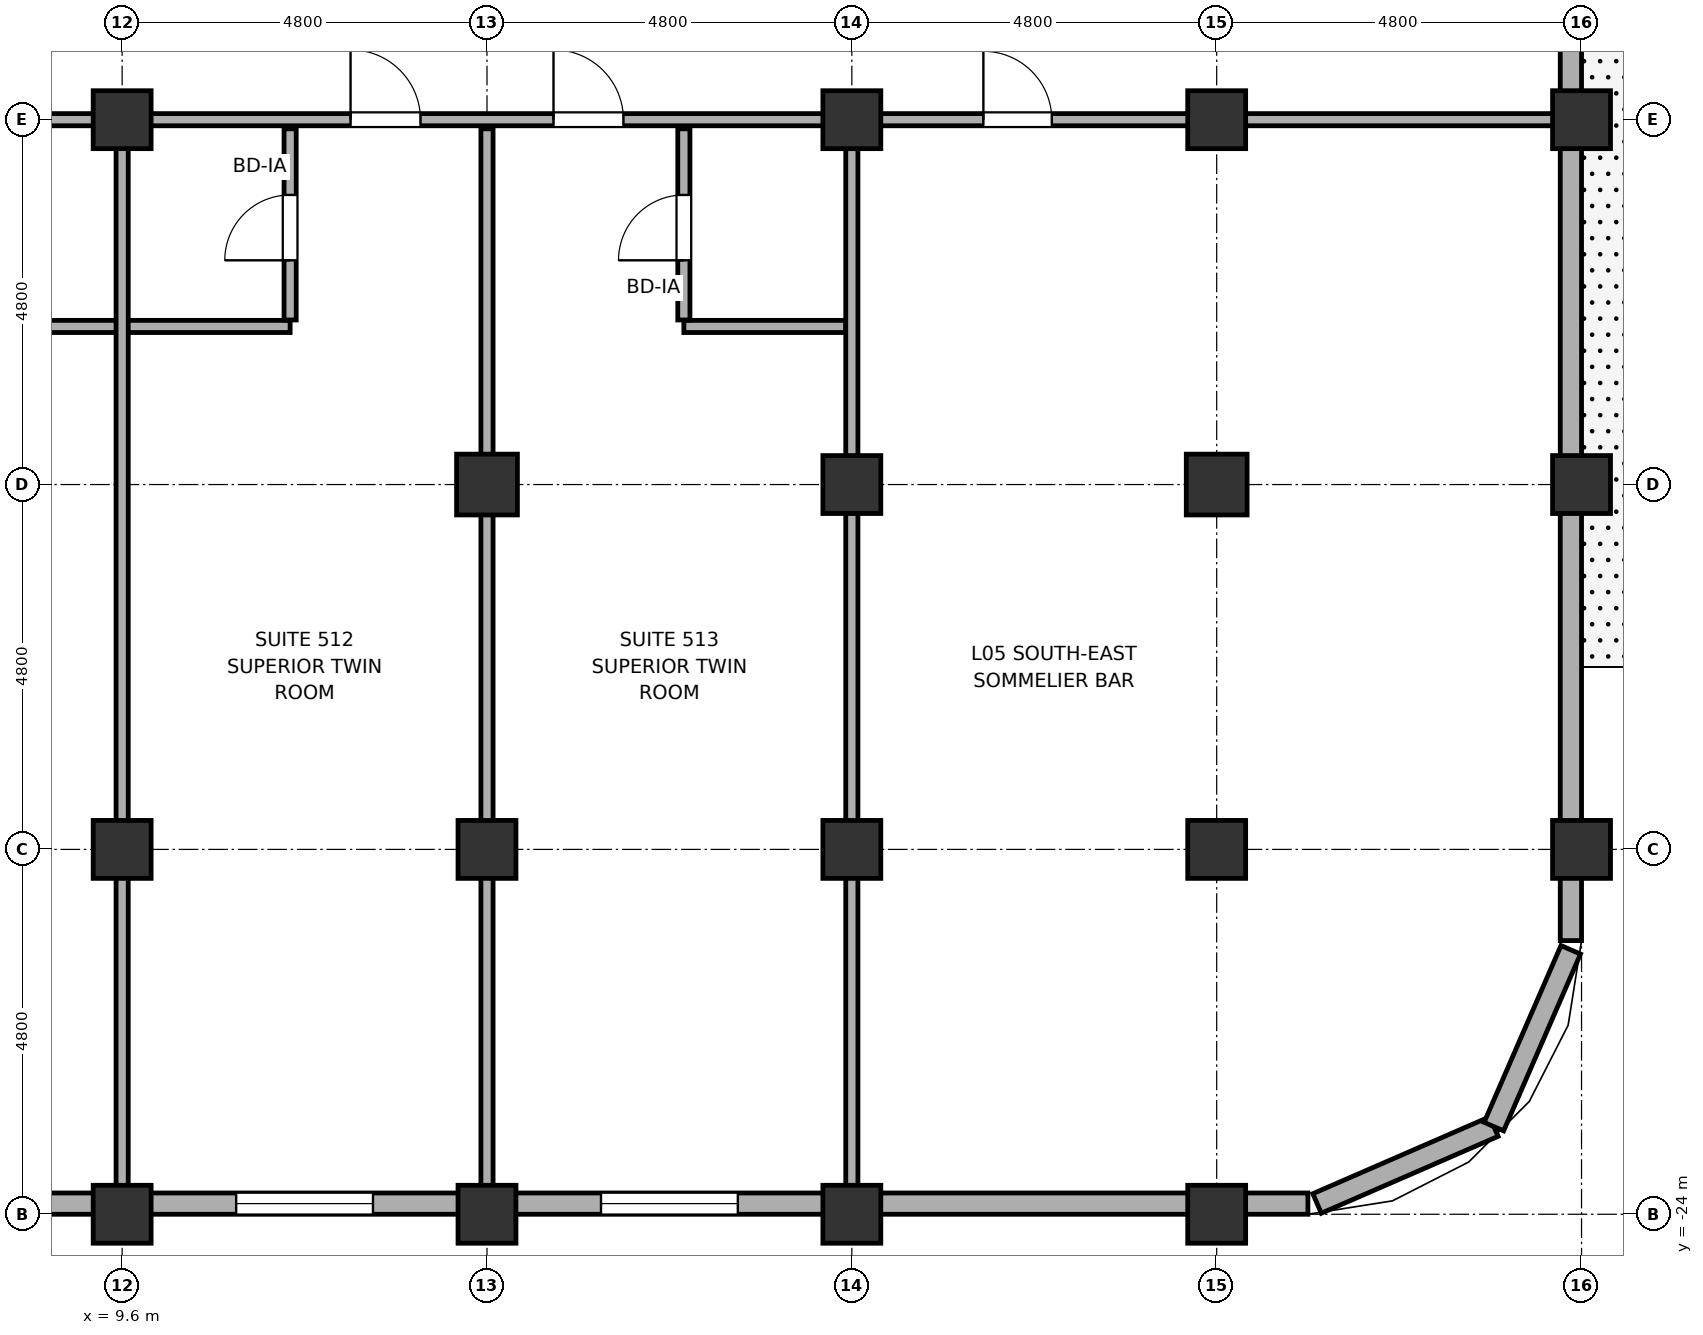
"""IFC4 building model, lengths in metres.
Left out: names, types, materials, properties, quantities, classifications, styles, units other than length and angle.
Written with IfcOpenShell. Run it as: python <this file> out.ifc"""

import sys

from ifc_helpers import new_model, si_unit, direction, frame, frame_2d, origin, origin_2d, place, context, subcontext, project, spatial, rectangle, hollow_rectangle, hollow_circle, extrude, element, fill, save


model = new_model("IFC4")
c1 = context("Model", 3, precision=1e-05, world=origin(), true_north=direction((0.0, 1.0)))
c2 = subcontext(c1, "Body", "Model", "MODEL_VIEW")
j1 = project(units=[si_unit("LENGTHUNIT", "METRE"), si_unit("PLANEANGLEUNIT", "RADIAN")], contexts=[c1])
p1 = place(None, origin())
s1 = spatial("IfcSite", under=j1, at=p1, CompositionType="ELEMENT")
p2 = place(p1, origin())
s2 = spatial("IfcBuilding", under=s1, at=p2, CompositionType="ELEMENT")
p3 = place(p2, frame((0.0, 0.0, 30.0)))
s3 = spatial("IfcBuildingStorey", under=s2, at=p3, CompositionType="ELEMENT", Elevation=30.0)
for number, where, z_axis, x_axis in (
    (1, (9.6, -24.0, 0.0), (0.0, 0.0, 1.0), (1.0, 0.0, 0.0)),
    (2, (9.6, -19.2, 0.0), (0.0, 0.0, 1.0), (1.0, 0.0, 0.0)),
    (3, (9.6, -9.6, 0.0), (0.0, 0.0, 1.0), (1.0, 0.0, 0.0)),
    (4, (14.4, -24.0, 0.0), (0.0, 0.0, 1.0), (1.0, 0.0, 0.0)),
    (5, (14.4, -19.2, 0.0), (0.0, 0.0, 1.0), (1.0, 0.0, 0.0)),
):
    element("IfcColumn", number, at=place(p3, frame(where, z_axis=z_axis, x_axis=x_axis)), inside=s3, PredefinedType="COLUMN", context=c2, shape_type="SweptSolid", body=[
        extrude(hollow_circle(Radius=0.381, WallThickness=0.032, at=origin_2d()), origin(), (0.0, 0.0, 1.0), 3.7),
    ])
p4 = place(p3, frame((14.4, -14.4, 0.0), z_axis=(0.0, 0.0, 1.0), x_axis=(1.0, 0.0, 0.0)))
e6 = element("IfcColumn", 6, at=p4, inside=s3, PredefinedType="COLUMN", context=c2, shape_type="SweptSolid", body=[
    extrude(hollow_rectangle(XDim=0.8, YDim=0.8, WallThickness=0.036, at=origin_2d()), origin(), (0.0, 0.0, 1.0), 3.7),
])
for number, where, z_axis, x_axis in (
    (7, (19.2, -24.0, 0.0), (0.0, 0.0, 1.0), (1.0, 0.0, 0.0)),
    (8, (19.2, -19.2, 0.0), (0.0, 0.0, 1.0), (1.0, 0.0, 0.0)),
    (9, (19.2, -14.4, 0.0), (0.0, 0.0, 1.0), (1.0, 0.0, 0.0)),
    (10, (19.2, -9.6, 0.0), (0.0, 0.0, 1.0), (1.0, 0.0, 0.0)),
    (11, (24.0, -24.0, 0.0), (0.0, 0.0, 1.0), (1.0, 0.0, 0.0)),
    (12, (24.0, -19.2, 0.0), (0.0, 0.0, 1.0), (1.0, 0.0, 0.0)),
):
    element("IfcColumn", number, at=place(p3, frame(where, z_axis=z_axis, x_axis=x_axis)), inside=s3, PredefinedType="COLUMN", context=c2, shape_type="SweptSolid", body=[
        extrude(hollow_circle(Radius=0.381, WallThickness=0.032, at=origin_2d()), origin(), (0.0, 0.0, 1.0), 3.7),
    ])
p5 = place(p3, frame((24.0, -14.4, 0.0), z_axis=(0.0, 0.0, 1.0), x_axis=(1.0, 0.0, 0.0)))
e13 = element("IfcColumn", 13, at=p5, inside=s3, PredefinedType="COLUMN", context=c2, shape_type="SweptSolid", body=[
    extrude(hollow_rectangle(XDim=0.8, YDim=0.8, WallThickness=0.036, at=origin_2d()), origin(), (0.0, 0.0, 1.0), 3.7),
])
for number, where, z_axis, x_axis in (
    (14, (24.0, -9.6, 0.0), (0.0, 0.0, 1.0), (1.0, 0.0, 0.0)),
    (15, (28.8, -19.2, 0.0), (0.0, 0.0, 1.0), (1.0, 0.0, 0.0)),
    (16, (28.8, -14.4, 0.0), (0.0, 0.0, 1.0), (1.0, 0.0, 0.0)),
    (17, (28.8, -9.6, 0.0), (0.0, 0.0, 1.0), (1.0, 0.0, 0.0)),
):
    element("IfcColumn", number, at=place(p3, frame(where, z_axis=z_axis, x_axis=x_axis)), inside=s3, PredefinedType="COLUMN", context=c2, shape_type="SweptSolid", body=[
        extrude(hollow_circle(Radius=0.381, WallThickness=0.032, at=origin_2d()), origin(), (0.0, 0.0, 1.0), 3.7),
    ])
p6 = place(p3, frame((25.321, -23.858, 0.0), z_axis=(0.0, 0.0, 1.0), x_axis=(0.917060872934, 0.398747232384, 0.0)))
e18 = element("IfcWall", 18, at=p6, inside=s3, PredefinedType="SOLIDWALL", context=c2, shape_type="SweptSolid", body=[
    extrude(rectangle(XDim=2.536, YDim=0.28, at=frame_2d((1.268, 0.0))), origin(), (0.0, 0.0, 1.0), 2.12),
])
p7 = place(p3, frame((27.646, -22.847, 0.0), z_axis=(0.0, 0.0, 1.0), x_axis=(0.398792985289, 0.917040977756, 0.0)))
e19 = element("IfcWall", 19, at=p7, inside=s3, PredefinedType="SOLIDWALL", context=c2, shape_type="SweptSolid", body=[
    extrude(rectangle(XDim=2.536, YDim=0.28, at=frame_2d((1.268, 0.0))), origin(), (0.0, 0.0, 1.0), 2.12),
])
p8 = place(p3, frame((4.75, -23.86, 0.0), z_axis=(0.0, 0.0, 1.0), x_axis=(1.0, 0.0, 0.0)))
e20 = element("IfcWall", 20, at=p8, inside=s3, PredefinedType="SOLIDWALL", context=c2, shape_type="SweptSolid", body=[
    extrude(rectangle(XDim=20.45, YDim=0.28, at=frame_2d((10.225, 0.0))), origin(), (0.0, 0.0, 1.0), 2.12),
])
p9 = place(p8, frame((1.55, 0.0, 0.75)))
e21 = element("IfcOpeningElement", 21, at=p9, cuts=e20, PredefinedType="OPENING", context=c2, shape_type="SweptSolid", body=[
    extrude(rectangle(XDim=1.8, YDim=1.15, at=frame_2d((0.9, 0.575))), frame((0.0, 0.155, 0.0), z_axis=(0.0, -1.0, 0.0), x_axis=(1.0, 0.0, 0.0)), (0.0, 0.0, 1.0), 0.31),
])
p10 = place(p8, frame((6.35, 0.0, 0.75)))
e22 = element("IfcOpeningElement", 22, at=p10, cuts=e20, PredefinedType="OPENING", context=c2, shape_type="SweptSolid", body=[
    extrude(rectangle(XDim=1.8, YDim=1.15, at=frame_2d((0.9, 0.575))), frame((0.0, 0.155, 0.0), z_axis=(0.0, -1.0, 0.0), x_axis=(1.0, 0.0, 0.0)), (0.0, 0.0, 1.0), 0.31),
])
p11 = place(p8, frame((11.15, 0.0, 0.75)))
e23 = element("IfcOpeningElement", 23, at=p11, cuts=e20, PredefinedType="OPENING", context=c2, shape_type="SweptSolid", body=[
    extrude(rectangle(XDim=1.8, YDim=1.15, at=frame_2d((0.9, 0.575))), frame((0.0, 0.155, 0.0), z_axis=(0.0, -1.0, 0.0), x_axis=(1.0, 0.0, 0.0)), (0.0, 0.0, 1.0), 0.31),
])
p12 = place(p3, frame((28.66, -20.4, 0.0), z_axis=(0.0, 0.0, 1.0), x_axis=(0.0, 1.0, 0.0)))
e24 = element("IfcWall", 24, at=p12, inside=s3, PredefinedType="SOLIDWALL", context=c2, shape_type="SweptSolid", body=[
    extrude(rectangle(XDim=20.38, YDim=0.28, at=frame_2d((10.19, 0.0))), origin(), (0.0, 0.0, 1.0), 2.12),
])
p13 = place(p12, frame((12.3, 0.0, 0.0)))
e25 = element("IfcOpeningElement", 25, at=p13, cuts=e24, PredefinedType="OPENING", context=c2, shape_type="SweptSolid", body=[
    extrude(rectangle(XDim=1.8, YDim=2.02, at=frame_2d((0.9, 1.01))), frame((0.0, 0.155, 0.0), z_axis=(0.0, -1.0, 0.0), x_axis=(1.0, 0.0, 0.0)), (0.0, 0.0, 1.0), 0.31),
])
p14 = place(p12, frame((17.25, 0.0, 0.75)))
e26 = element("IfcOpeningElement", 26, at=p14, cuts=e24, PredefinedType="OPENING", context=c2, shape_type="SweptSolid", body=[
    extrude(rectangle(XDim=1.5, YDim=1.15, at=frame_2d((0.75, 0.575))), frame((0.0, 0.155, 0.0), z_axis=(0.0, -1.0, 0.0), x_axis=(1.0, 0.0, 0.0)), (0.0, 0.0, 1.0), 0.31),
])
p15 = place(p3, frame((7.39, -12.32, 0.0), z_axis=(0.0, 0.0, 1.0), x_axis=(1.0, 0.0, 0.0)))
e27 = element("IfcWall", 27, at=p15, inside=s3, PredefinedType="PARTITIONING", context=c2, shape_type="SweptSolid", body=[
    extrude(rectangle(XDim=4.42, YDim=0.16, at=frame_2d((2.21, 0.0))), origin(), (0.0, 0.0, 1.0), 3.02),
])
p16 = place(p3, frame((16.99, -12.32, 0.0), z_axis=(0.0, 0.0, 1.0), x_axis=(1.0, 0.0, 0.0)))
e28 = element("IfcWall", 28, at=p16, inside=s3, PredefinedType="PARTITIONING", context=c2, shape_type="SweptSolid", body=[
    extrude(rectangle(XDim=2.13, YDim=0.16, at=frame_2d((1.065, 0.0))), origin(), (0.0, 0.0, 1.0), 2.82),
])
p17 = place(p3, frame((-33.31, -9.6, 0.0), z_axis=(0.0, 0.0, 1.0), x_axis=(1.0, 0.0, 0.0)))
e29 = element("IfcWall", 29, at=p17, inside=s3, PredefinedType="PARTITIONING", context=c2, shape_type="SweptSolid", body=[
    extrude(rectangle(XDim=61.82, YDim=0.16, at=frame_2d((30.91, 0.0))), origin(), (0.0, 0.0, 1.0), 2.12),
])
p18 = place(p17, frame((6.679, 0.0, 0.0)))
e30 = element("IfcOpeningElement", 30, at=p18, cuts=e29, PredefinedType="OPENING", context=c2, shape_type="SweptSolid", body=[
    extrude(rectangle(XDim=0.9, YDim=2.02, at=frame_2d((0.45, 1.01))), frame((0.0, 0.095, 0.0), z_axis=(0.0, -1.0, 0.0), x_axis=(1.0, 0.0, 0.0)), (0.0, 0.0, 1.0), 0.19),
])
p19 = place(p17, frame((54.24, 0.0, 0.0)))
e31 = element("IfcOpeningElement", 31, at=p19, cuts=e29, PredefinedType="OPENING", context=c2, shape_type="SweptSolid", body=[
    extrude(rectangle(XDim=0.9, YDim=2.02, at=frame_2d((0.45, 1.01))), frame((0.0, 0.095, 0.0), z_axis=(0.0, -1.0, 0.0), x_axis=(1.0, 0.0, 0.0)), (0.0, 0.0, 1.0), 0.19),
])
p20 = place(p17, frame((10.68, 0.0, 0.0)))
e32 = element("IfcOpeningElement", 32, at=p20, cuts=e29, PredefinedType="OPENING", context=c2, shape_type="SweptSolid", body=[
    extrude(rectangle(XDim=0.92, YDim=2.02, at=frame_2d((0.46, 1.01))), frame((0.0, 0.095, 0.0), z_axis=(0.0, -1.0, 0.0), x_axis=(1.0, 0.0, 0.0)), (0.0, 0.0, 1.0), 0.19),
])
p21 = place(p17, frame((17.115, 0.0, 0.0)))
e33 = element("IfcOpeningElement", 33, at=p21, cuts=e29, PredefinedType="OPENING", context=c2, shape_type="SweptSolid", body=[
    extrude(rectangle(XDim=0.92, YDim=2.02, at=frame_2d((0.46, 1.01))), frame((0.0, 0.095, 0.0), z_axis=(0.0, -1.0, 0.0), x_axis=(1.0, 0.0, 0.0)), (0.0, 0.0, 1.0), 0.19),
])
p22 = place(p17, frame((19.785, 0.0, 0.0)))
e34 = element("IfcOpeningElement", 34, at=p22, cuts=e29, PredefinedType="OPENING", context=c2, shape_type="SweptSolid", body=[
    extrude(rectangle(XDim=0.92, YDim=2.02, at=frame_2d((0.46, 1.01))), frame((0.0, 0.095, 0.0), z_axis=(0.0, -1.0, 0.0), x_axis=(1.0, 0.0, 0.0)), (0.0, 0.0, 1.0), 0.19),
])
p23 = place(p17, frame((26.715, 0.0, 0.0)))
e35 = element("IfcOpeningElement", 35, at=p23, cuts=e29, PredefinedType="OPENING", context=c2, shape_type="SweptSolid", body=[
    extrude(rectangle(XDim=0.92, YDim=2.02, at=frame_2d((0.46, 1.01))), frame((0.0, 0.095, 0.0), z_axis=(0.0, -1.0, 0.0), x_axis=(1.0, 0.0, 0.0)), (0.0, 0.0, 1.0), 0.19),
])
p24 = place(p17, frame((29.385, 0.0, 0.0)))
e36 = element("IfcOpeningElement", 36, at=p24, cuts=e29, PredefinedType="OPENING", context=c2, shape_type="SweptSolid", body=[
    extrude(rectangle(XDim=0.92, YDim=2.02, at=frame_2d((0.46, 1.01))), frame((0.0, 0.095, 0.0), z_axis=(0.0, -1.0, 0.0), x_axis=(1.0, 0.0, 0.0)), (0.0, 0.0, 1.0), 0.19),
])
p25 = place(p17, frame((36.315, 0.0, 0.0)))
e37 = element("IfcOpeningElement", 37, at=p25, cuts=e29, PredefinedType="OPENING", context=c2, shape_type="SweptSolid", body=[
    extrude(rectangle(XDim=0.92, YDim=2.02, at=frame_2d((0.46, 1.01))), frame((0.0, 0.095, 0.0), z_axis=(0.0, -1.0, 0.0), x_axis=(1.0, 0.0, 0.0)), (0.0, 0.0, 1.0), 0.19),
])
p26 = place(p17, frame((38.985, 0.0, 0.0)))
e38 = element("IfcOpeningElement", 38, at=p26, cuts=e29, PredefinedType="OPENING", context=c2, shape_type="SweptSolid", body=[
    extrude(rectangle(XDim=0.92, YDim=2.02, at=frame_2d((0.46, 1.01))), frame((0.0, 0.095, 0.0), z_axis=(0.0, -1.0, 0.0), x_axis=(1.0, 0.0, 0.0)), (0.0, 0.0, 1.0), 0.19),
])
p27 = place(p17, frame((45.915, 0.0, 0.0)))
e39 = element("IfcOpeningElement", 39, at=p27, cuts=e29, PredefinedType="OPENING", context=c2, shape_type="SweptSolid", body=[
    extrude(rectangle(XDim=0.92, YDim=2.02, at=frame_2d((0.46, 1.01))), frame((0.0, 0.095, 0.0), z_axis=(0.0, -1.0, 0.0), x_axis=(1.0, 0.0, 0.0)), (0.0, 0.0, 1.0), 0.19),
])
p28 = place(p17, frame((48.585, 0.0, 0.0)))
e40 = element("IfcOpeningElement", 40, at=p28, cuts=e29, PredefinedType="OPENING", context=c2, shape_type="SweptSolid", body=[
    extrude(rectangle(XDim=0.92, YDim=2.02, at=frame_2d((0.46, 1.01))), frame((0.0, 0.095, 0.0), z_axis=(0.0, -1.0, 0.0), x_axis=(1.0, 0.0, 0.0)), (0.0, 0.0, 1.0), 0.19),
])
p29 = place(p3, frame((9.6, -23.71, 0.0), z_axis=(0.0, 0.0, 1.0), x_axis=(0.0, 1.0, 0.0)))
e41 = element("IfcWall", 41, at=p29, inside=s3, PredefinedType="PARTITIONING", context=c2, shape_type="SweptSolid", body=[
    extrude(rectangle(XDim=13.99, YDim=0.16, at=frame_2d((6.995, 0.0))), origin(), (0.0, 0.0, 1.0), 2.12),
])
p30 = place(p3, frame((11.81, -12.235, 0.0), z_axis=(0.0, 0.0, 1.0), x_axis=(0.0, 1.0, 0.0)))
e42 = element("IfcWall", 42, at=p30, inside=s3, PredefinedType="PARTITIONING", context=c2, shape_type="SweptSolid", body=[
    extrude(rectangle(XDim=2.515, YDim=0.16, at=frame_2d((1.258, 0.0))), origin(), (0.0, 0.0, 1.0), 2.12),
])
p31 = place(p30, frame((0.785, 0.0, 0.0)))
e43 = element("IfcOpeningElement", 43, at=p31, cuts=e42, PredefinedType="OPENING", context=c2, shape_type="SweptSolid", body=[
    extrude(rectangle(XDim=0.86, YDim=2.02, at=frame_2d((0.43, 1.01))), frame((0.0, 0.095, 0.0), z_axis=(0.0, -1.0, 0.0), x_axis=(1.0, 0.0, 0.0)), (0.0, 0.0, 1.0), 0.19),
])
p32 = place(p3, frame((14.4, -23.71, 0.0), z_axis=(0.0, 0.0, 1.0), x_axis=(0.0, 1.0, 0.0)))
e44 = element("IfcWall", 44, at=p32, inside=s3, PredefinedType="PARTITIONING", context=c2, shape_type="SweptSolid", body=[
    extrude(rectangle(XDim=13.99, YDim=0.16, at=frame_2d((6.995, 0.0))), origin(), (0.0, 0.0, 1.0), 2.12),
])
p33 = place(p3, frame((16.99, -12.235, 0.0), z_axis=(0.0, 0.0, 1.0), x_axis=(0.0, 1.0, 0.0)))
e45 = element("IfcWall", 45, at=p33, inside=s3, PredefinedType="PARTITIONING", context=c2, shape_type="SweptSolid", body=[
    extrude(rectangle(XDim=2.515, YDim=0.16, at=frame_2d((1.258, 0.0))), origin(), (0.0, 0.0, 1.0), 2.12),
])
p34 = place(p33, frame((0.785, 0.0, 0.0)))
e46 = element("IfcOpeningElement", 46, at=p34, cuts=e45, PredefinedType="OPENING", context=c2, shape_type="SweptSolid", body=[
    extrude(rectangle(XDim=0.86, YDim=2.02, at=frame_2d((0.43, 1.01))), frame((0.0, 0.095, 0.0), z_axis=(0.0, -1.0, 0.0), x_axis=(1.0, 0.0, 0.0)), (0.0, 0.0, 1.0), 0.19),
])
p35 = place(p3, frame((19.2, -23.71, 0.0), z_axis=(0.0, 0.0, 1.0), x_axis=(0.0, 1.0, 0.0)))
e47 = element("IfcWall", 47, at=p35, inside=s3, PredefinedType="PARTITIONING", context=c2, shape_type="SweptSolid", body=[
    extrude(rectangle(XDim=13.99, YDim=0.16, at=frame_2d((6.995, 0.0))), origin(), (0.0, 0.0, 1.0), 2.12),
])
p36 = place(p10, origin())
e48 = element("IfcWindow", 48, at=p36, inside=s3, PartitioningType="SINGLE_PANEL", PredefinedType="WINDOW", context=c2, shape_type="SweptSolid", body=[
    extrude(rectangle(XDim=1.8, YDim=1.15, at=frame_2d((0.9, 0.575))), frame((0.0, 0.03, 0.0), z_axis=(0.0, -1.0, 0.0), x_axis=(1.0, 0.0, 0.0)), (0.0, 0.0, 1.0), 0.06),
])
fill(e22, e48)
p37 = place(p11, origin())
e49 = element("IfcWindow", 49, at=p37, inside=s3, PartitioningType="SINGLE_PANEL", PredefinedType="WINDOW", context=c2, shape_type="SweptSolid", body=[
    extrude(rectangle(XDim=1.8, YDim=1.15, at=frame_2d((0.9, 0.575))), frame((0.0, 0.03, 0.0), z_axis=(0.0, -1.0, 0.0), x_axis=(1.0, 0.0, 0.0)), (0.0, 0.0, 1.0), 0.06),
])
fill(e23, e49)
p38 = place(p19, origin())
e50 = element("IfcDoor", 50, at=p38, inside=s3, OperationType="SINGLE_SWING_RIGHT", PredefinedType="DOOR", context=c2, shape_type="SweptSolid", body=[
    extrude(rectangle(XDim=0.9, YDim=2.02, at=frame_2d((0.45, 1.01))), frame((0.0, 0.025, 0.0), z_axis=(0.0, -1.0, 0.0), x_axis=(1.0, 0.0, 0.0)), (0.0, 0.0, 1.0), 0.05),
])
fill(e31, e50)
p39 = place(p27, origin())
e51 = element("IfcDoor", 51, at=p39, inside=s3, OperationType="SINGLE_SWING_RIGHT", PredefinedType="DOOR", context=c2, shape_type="SweptSolid", body=[
    extrude(rectangle(XDim=0.92, YDim=2.02, at=frame_2d((0.46, 1.01))), frame((0.0, 0.025, 0.0), z_axis=(0.0, -1.0, 0.0), x_axis=(1.0, 0.0, 0.0)), (0.0, 0.0, 1.0), 0.05),
])
fill(e39, e51)
p40 = place(p31, origin())
e52 = element("IfcDoor", 52, at=p40, inside=s3, OperationType="SINGLE_SWING_LEFT", PredefinedType="DOOR", context=c2, shape_type="SweptSolid", body=[
    extrude(rectangle(XDim=0.86, YDim=2.02, at=frame_2d((0.43, 1.01))), frame((0.0, 0.025, 0.0), z_axis=(0.0, -1.0, 0.0), x_axis=(1.0, 0.0, 0.0)), (0.0, 0.0, 1.0), 0.05),
])
fill(e43, e52)
p41 = place(p28, origin())
e53 = element("IfcDoor", 53, at=p41, inside=s3, OperationType="SINGLE_SWING_LEFT", PredefinedType="DOOR", context=c2, shape_type="SweptSolid", body=[
    extrude(rectangle(XDim=0.92, YDim=2.02, at=frame_2d((0.46, 1.01))), frame((0.0, 0.025, 0.0), z_axis=(0.0, -1.0, 0.0), x_axis=(1.0, 0.0, 0.0)), (0.0, 0.0, 1.0), 0.05),
])
fill(e40, e53)
p42 = place(p34, origin())
e54 = element("IfcDoor", 54, at=p42, inside=s3, OperationType="SINGLE_SWING_RIGHT", PredefinedType="DOOR", context=c2, shape_type="SweptSolid", body=[
    extrude(rectangle(XDim=0.86, YDim=2.02, at=frame_2d((0.43, 1.01))), frame((0.0, 0.025, 0.0), z_axis=(0.0, -1.0, 0.0), x_axis=(1.0, 0.0, 0.0)), (0.0, 0.0, 1.0), 0.05),
])
fill(e46, e54)
save(model, sys.argv[1])
